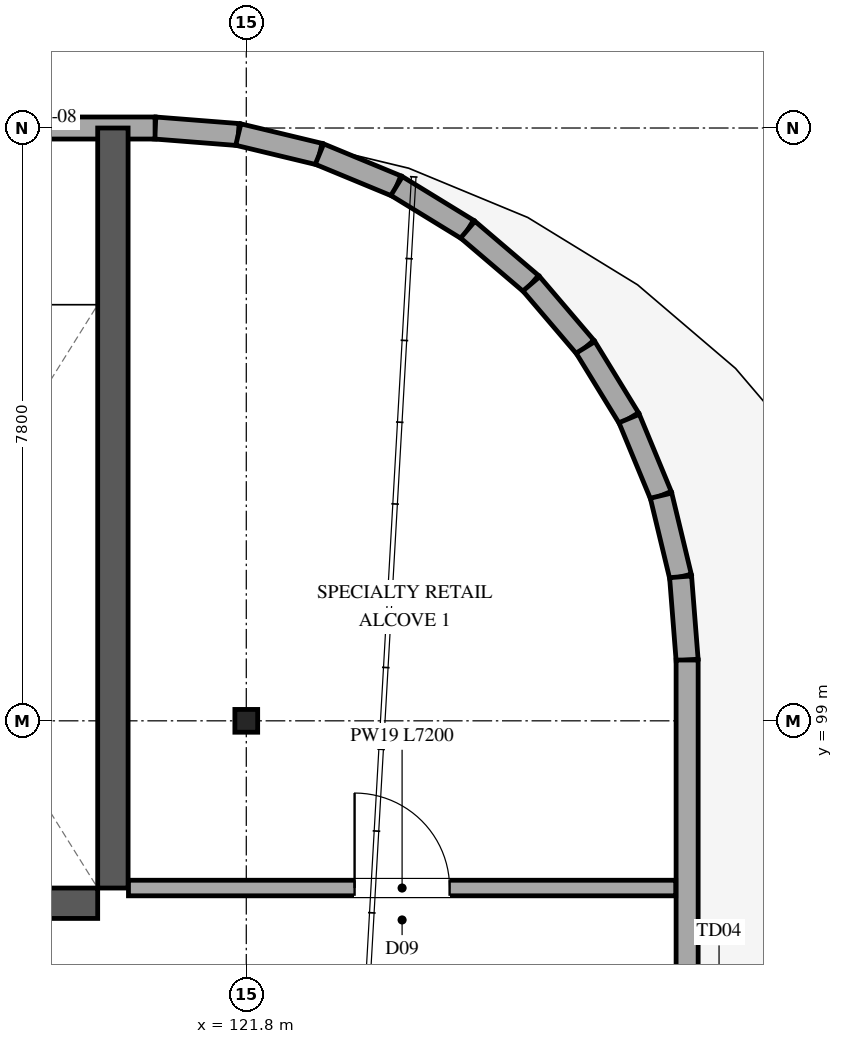
"""IFC4 building model, lengths in metres.
Left out: names, types, materials, properties, quantities, classifications, styles, units other than length and angle.
Written with IfcOpenShell. Run it as: python <this file> out.ifc"""

import sys

from ifc_helpers import new_model, si_unit, direction, frame, frame_2d, origin, origin_2d, place, context, subcontext, project, spatial, rectangle, i_section, extrude, element, fill, save


model = new_model("IFC4")
c1 = context("Model", 3, precision=1e-05, world=origin(), true_north=direction((0.0, 1.0)))
c2 = subcontext(c1, "Body", "Model", "MODEL_VIEW")
j1 = project(units=[si_unit("LENGTHUNIT", "METRE"), si_unit("PLANEANGLEUNIT", "RADIAN")], contexts=[c1])
p1 = place(None, origin())
s1 = spatial("IfcSite", under=j1, at=p1, CompositionType="ELEMENT")
p2 = place(p1, origin())
s2 = spatial("IfcBuilding", under=s1, at=p2, CompositionType="ELEMENT")
p3 = place(p2, frame((0.0, 0.0, 36.3)))
s3 = spatial("IfcBuildingStorey", under=s2, at=p3, CompositionType="ELEMENT", Elevation=36.3)
p4 = place(p3, frame((121.8, 99.0, 0.0), z_axis=(0.0, 0.0, 1.0), x_axis=(1.0, 0.0, 0.0)))
e1 = element("IfcColumn", 1, at=p4, inside=s3, PredefinedType="PILASTER", context=c2, shape_type="SweptSolid", body=[
    extrude(i_section(OverallWidth=0.3, OverallDepth=0.3, WebThickness=0.01, FlangeThickness=0.015, FilletRadius=0.018, at=origin_2d()), origin(), (0.0, 0.0, 1.0), 4.8),
])
for number, where, z_axis, x_axis in (
    (2, (120.6, 106.8, 0.0), (0.0, 0.0, 1.0), (0.997, -0.078, 0.0)),
    (3, (121.695, 106.714, 0.0), (0.0, 0.0, 1.0), (0.972, -0.234, 0.0)),
):
    element("IfcWall", number, at=place(p3, frame(where, z_axis=z_axis, x_axis=x_axis)), inside=s3, PredefinedType="STANDARD", context=c2, shape_type="SweptSolid", body=[
        extrude(rectangle(XDim=1.098, YDim=0.29, at=frame_2d((0.549, 0.0))), origin(), (0.0, 0.0, 1.0), 4.49),
    ])
p5 = place(p3, frame((122.763, 106.457, 0.0), z_axis=(0.0, 0.0, 1.0), x_axis=(0.924060145724, -0.382247102127, 0.0)))
e4 = element("IfcWall", 4, at=p5, inside=s3, PredefinedType="STANDARD", context=c2, shape_type="SweptSolid", body=[
    extrude(rectangle(XDim=1.099, YDim=0.29, at=frame_2d((0.549, 0.0))), origin(), (0.0, 0.0, 1.0), 4.49),
])
p6 = place(p3, frame((123.778, 106.037, 0.0), z_axis=(0.0, 0.0, 1.0), x_axis=(0.852390294689, -0.522906096273, 0.0)))
e5 = element("IfcWall", 5, at=p6, inside=s3, PredefinedType="STANDARD", context=c2, shape_type="SweptSolid", body=[
    extrude(rectangle(XDim=1.098, YDim=0.29, at=frame_2d((0.549, 0.0))), origin(), (0.0, 0.0, 1.0), 4.49),
])
for number, where, z_axis, x_axis in (
    (6, (124.714, 105.463, 0.0), (0.0, 0.0, 1.0), (0.761, -0.649, 0.0)),
    (7, (125.55, 104.75, 0.0), (0.0, 0.0, 1.0), (0.649, -0.761, 0.0)),
):
    element("IfcWall", number, at=place(p3, frame(where, z_axis=z_axis, x_axis=x_axis)), inside=s3, PredefinedType="STANDARD", context=c2, shape_type="SweptSolid", body=[
        extrude(rectangle(XDim=1.099, YDim=0.29, at=frame_2d((0.549, 0.0))), origin(), (0.0, 0.0, 1.0), 4.49),
    ])
p7 = place(p3, frame((126.263, 103.914, 0.0), z_axis=(0.0, 0.0, 1.0), x_axis=(0.522744534314, -0.85248938518, 0.0)))
e8 = element("IfcWall", 8, at=p7, inside=s3, PredefinedType="STANDARD", context=c2, shape_type="SweptSolid", body=[
    extrude(rectangle(XDim=1.098, YDim=0.29, at=frame_2d((0.549, 0.0))), origin(), (0.0, 0.0, 1.0), 4.49),
])
p8 = place(p3, frame((126.837, 102.978, 0.0), z_axis=(0.0, 0.0, 1.0), x_axis=(0.382436842998, -0.923981634622, 0.0)))
e9 = element("IfcWall", 9, at=p8, inside=s3, PredefinedType="STANDARD", context=c2, shape_type="SweptSolid", body=[
    extrude(rectangle(XDim=1.099, YDim=0.29, at=frame_2d((0.549, 0.0))), origin(), (0.0, 0.0, 1.0), 4.49),
])
for number, where, z_axis, x_axis in (
    (10, (127.257, 101.963, 0.0), (0.0, 0.0, 1.0), (0.234, -0.972, 0.0)),
    (11, (127.514, 100.895, 0.0), (0.0, 0.0, 1.0), (0.078, -0.997, 0.0)),
):
    element("IfcWall", number, at=place(p3, frame(where, z_axis=z_axis, x_axis=x_axis)), inside=s3, PredefinedType="STANDARD", context=c2, shape_type="SweptSolid", body=[
        extrude(rectangle(XDim=1.098, YDim=0.29, at=frame_2d((0.549, 0.0))), origin(), (0.0, 0.0, 1.0), 4.49),
    ])
p9 = place(p3, frame((127.6, 99.8, 0.0), z_axis=(0.0, 0.0, 1.0), x_axis=(0.0, -1.0, 0.0)))
e12 = element("IfcWall", 12, at=p9, inside=s3, PredefinedType="STANDARD", context=c2, shape_type="SweptSolid", body=[
    extrude(rectangle(XDim=9.248, YDim=0.29, at=frame_2d((4.624, 0.0))), origin(), (0.0, 0.0, 1.0), 4.49),
])
p10 = place(p9, frame((4.074, 0.0, 0.0)))
e13 = element("IfcOpeningElement", 13, at=p10, cuts=e12, PredefinedType="OPENING", context=c2, shape_type="SweptSolid", body=[
    extrude(rectangle(XDim=1.1, YDim=2.2, at=frame_2d((0.55, 1.1))), frame((0.0, 0.155, 0.0), z_axis=(0.0, -1.0, 0.0), x_axis=(1.0, 0.0, 0.0)), (0.0, 0.0, 1.0), 0.31),
])
p11 = place(p3, frame((113.252, 106.8, 0.0), z_axis=(0.0, 0.0, 1.0), x_axis=(1.0, 0.0, 0.0)))
e14 = element("IfcWall", 14, at=p11, inside=s3, PredefinedType="STANDARD", context=c2, shape_type="SweptSolid", body=[
    extrude(rectangle(XDim=7.348, YDim=0.29, at=frame_2d((3.674, 0.0))), origin(), (0.0, 0.0, 1.0), 3.795),
])
p12 = place(p3, frame((120.045, 106.8, 0.0), z_axis=(0.0, 0.0, 1.0), x_axis=(0.0, -1.0, 0.0)))
e15 = element("IfcWall", 15, at=p12, inside=s3, PredefinedType="SHEAR", context=c2, shape_type="SweptSolid", body=[
    extrude(rectangle(XDim=10.0, YDim=0.4, at=frame_2d((5.0, 0.0))), origin(), (0.0, 0.0, 1.0), 4.8),
])
p13 = place(p3, frame((119.845, 96.6, 0.0), z_axis=(0.0, 0.0, 1.0), x_axis=(-1.0, 0.0, 0.0)))
e16 = element("IfcWall", 16, at=p13, inside=s3, PredefinedType="SHEAR", context=c2, shape_type="SweptSolid", body=[
    extrude(rectangle(XDim=4.79, YDim=0.4, at=frame_2d((2.395, 0.0))), origin(), (0.0, 0.0, 1.0), 4.8),
])
p14 = place(p3, frame((120.25, 96.8, 0.0), z_axis=(0.0, 0.0, 1.0), x_axis=(1.0, 0.0, 0.0)))
e17 = element("IfcWall", 17, at=p14, inside=s3, PredefinedType="PARTITIONING", context=c2, shape_type="SweptSolid", body=[
    extrude(rectangle(XDim=7.2, YDim=0.205, at=frame_2d((3.6, 0.0))), origin(), (0.0, 0.0, 1.0), 3.8),
])
p15 = place(p14, frame((2.975, 0.0, 0.0)))
e18 = element("IfcOpeningElement", 18, at=p15, cuts=e17, PredefinedType="OPENING", context=c2, shape_type="SweptSolid", body=[
    extrude(rectangle(XDim=1.25, YDim=2.25, at=frame_2d((0.625, 1.125))), frame((0.0, 0.113, 0.0), z_axis=(0.0, -1.0, 0.0), x_axis=(1.0, 0.0, 0.0)), (0.0, 0.0, 1.0), 0.225),
])
p16 = place(p15, origin())
e19 = element("IfcDoor", 19, at=p16, inside=s3, OperationType="SINGLE_SWING_LEFT", PredefinedType="DOOR", context=c2, shape_type="SweptSolid", body=[
    extrude(rectangle(XDim=1.25, YDim=2.25, at=frame_2d((0.625, 1.125))), frame((0.0, 0.025, 0.0), z_axis=(0.0, -1.0, 0.0), x_axis=(1.0, 0.0, 0.0)), (0.0, 0.0, 1.0), 0.05),
])
fill(e18, e19)
save(model, sys.argv[1])
